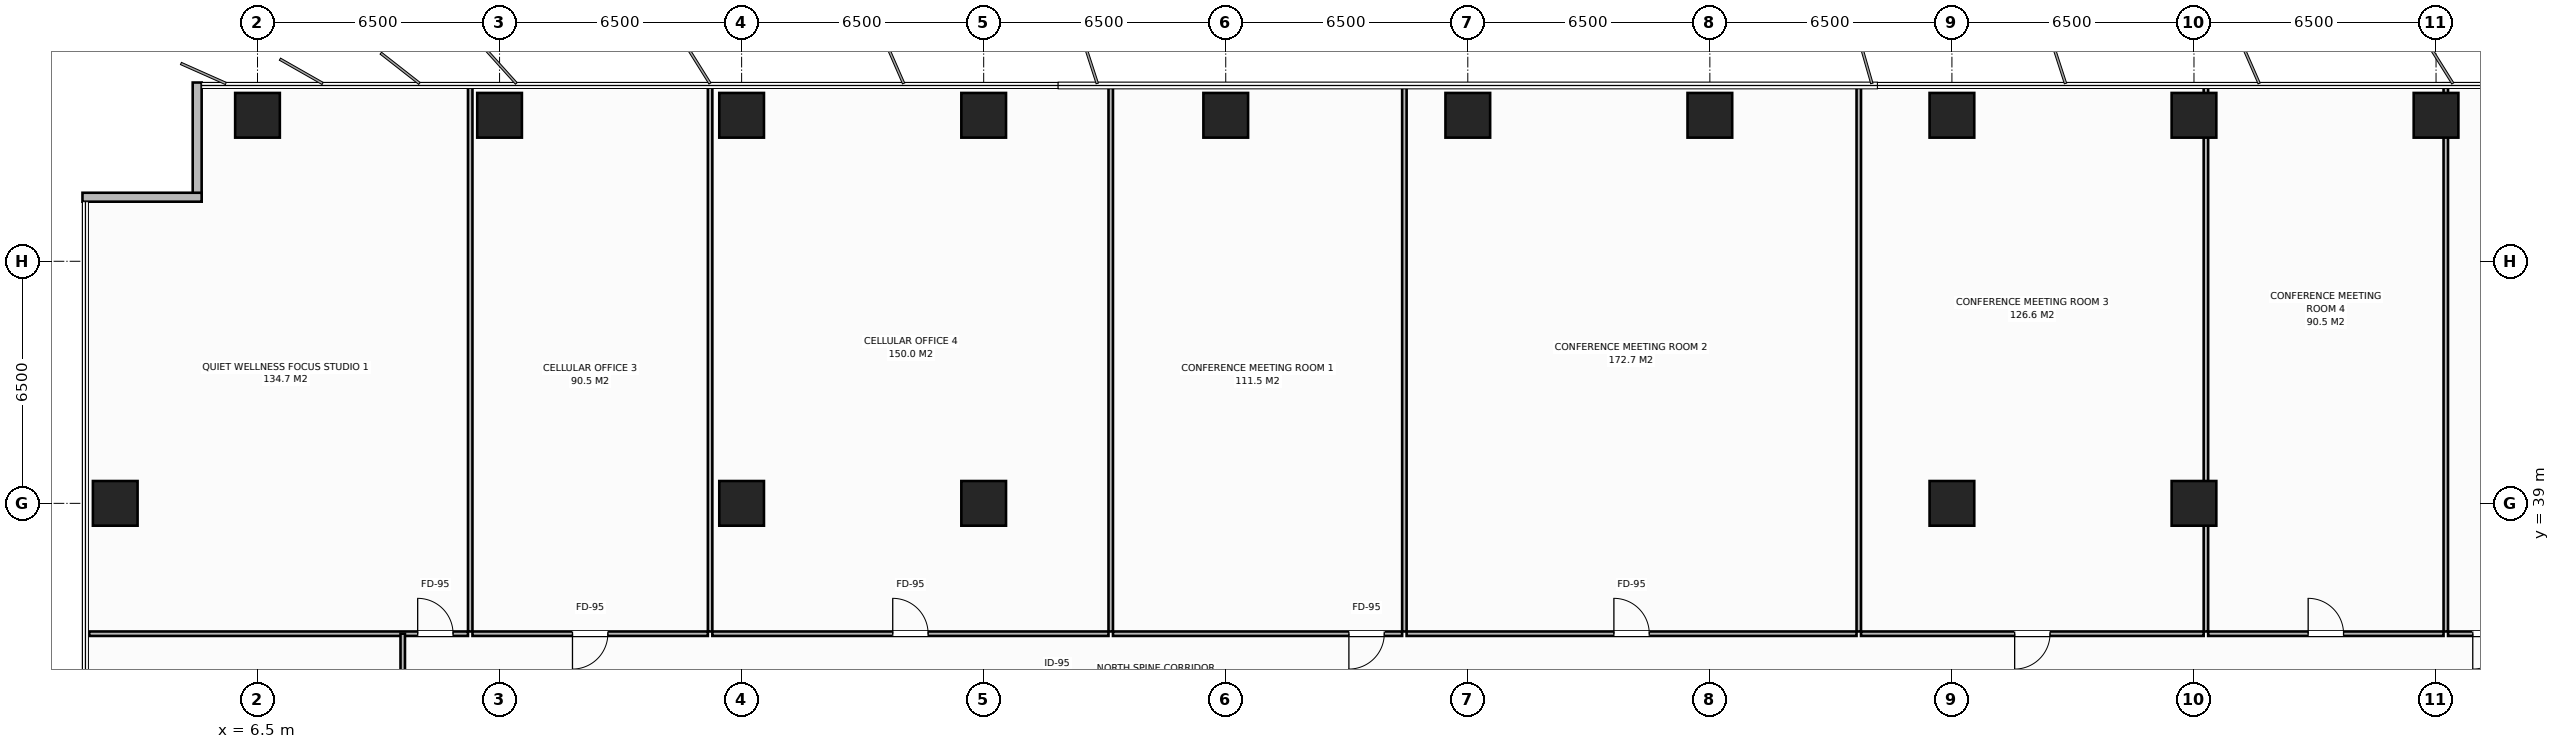
"""IFC4 building model, lengths in metres.
Left out: names, types, materials, properties, quantities, classifications, styles, units other than length and angle.
Written with IfcOpenShell. Run it as: python <this file> out.ifc"""

import sys

from ifc_helpers import new_model, si_unit, direction, frame, frame_2d, origin, origin_2d, place, context, subcontext, project, spatial, rectangle, extrude, element, fill, save


model = new_model("IFC4")
c1 = context("Model", 3, precision=1e-05, world=origin(), true_north=direction((0.0, 1.0)))
c2 = subcontext(c1, "Body", "Model", "MODEL_VIEW")
j1 = project(units=[si_unit("LENGTHUNIT", "METRE"), si_unit("PLANEANGLEUNIT", "RADIAN")], contexts=[c1])
p1 = place(None, origin())
s1 = spatial("IfcSite", under=j1, at=p1, CompositionType="ELEMENT")
p2 = place(p1, origin())
s2 = spatial("IfcBuilding", under=s1, at=p2, CompositionType="ELEMENT")
p3 = place(p2, frame((0.0, 0.0, 124.0)))
s3 = spatial("IfcBuildingStorey", under=s2, at=p3, CompositionType="ELEMENT", Elevation=124.0)
for number, where, z_axis, x_axis in (
    (1, (19.5, 39.0, 0.0), (0.0, 0.0, 1.0), (1.0, 0.0, 0.0)),
    (2, (58.5, 39.0, 0.0), (0.0, 0.0, 1.0), (1.0, 0.0, 0.0)),
    (3, (26.0, 39.0, 0.0), (0.0, 0.0, 1.0), (1.0, 0.0, 0.0)),
    (4, (52.0, 39.0, 0.0), (0.0, 0.0, 1.0), (1.0, 0.0, 0.0)),
    (5, (6.5, 49.42, 0.0), (0.0, 0.0, 1.0), (1.0, 0.0, 0.0)),
    (6, (13.0, 49.42, 0.0), (0.0, 0.0, 1.0), (1.0, 0.0, 0.0)),
    (7, (19.5, 49.42, 0.0), (0.0, 0.0, 1.0), (1.0, 0.0, 0.0)),
    (8, (26.0, 49.42, 0.0), (0.0, 0.0, 1.0), (1.0, 0.0, 0.0)),
    (9, (32.5, 49.42, 0.0), (0.0, 0.0, 1.0), (1.0, 0.0, 0.0)),
    (10, (39.0, 49.42, 0.0), (0.0, 0.0, 1.0), (1.0, 0.0, 0.0)),
    (11, (45.5, 49.42, 0.0), (0.0, 0.0, 1.0), (1.0, 0.0, 0.0)),
    (12, (52.0, 49.42, 0.0), (0.0, 0.0, 1.0), (1.0, 0.0, 0.0)),
    (13, (58.5, 49.42, 0.0), (0.0, 0.0, 1.0), (1.0, 0.0, 0.0)),
    (14, (65.0, 49.42, 0.0), (0.0, 0.0, 1.0), (1.0, 0.0, 0.0)),
    (15, (2.68, 39.0, 0.0), (0.0, 0.0, 1.0), (1.0, 0.0, 0.0)),
):
    element("IfcColumn", number, at=place(p3, frame(where, z_axis=z_axis, x_axis=x_axis)), inside=s3, PredefinedType="COLUMN", context=c2, shape_type="SweptSolid", body=[
        extrude(rectangle(XDim=1.2, YDim=1.2, at=origin_2d()), origin(), (0.0, 0.0, 1.0), 3.8),
    ])
for number, where, z_axis, x_axis in (
    (16, (4.88, 47.1, 0.0), (0.0, 0.0, 1.0), (0.0, 1.0, 0.0)),
    (17, (1.8, 47.22, 0.0), (0.0, 0.0, 1.0), (1.0, 0.0, 0.0)),
):
    element("IfcWall", number, at=place(p3, frame(where, z_axis=z_axis, x_axis=x_axis)), inside=s3, PredefinedType="STANDARD", context=c2, shape_type="SweptSolid", body=[
        extrude(rectangle(XDim=3.2, YDim=0.24, at=frame_2d((1.6, 0.0))), origin(), (0.0, 0.0, 1.0), 3.565),
    ])
p4 = place(p3, frame((12.212, 35.56, 0.0), z_axis=(0.0, 0.0, 1.0), x_axis=(0.0, 1.0, 0.0)))
e18 = element("IfcWall", 18, at=p4, inside=s3, PredefinedType="PARTITIONING", context=c2, shape_type="SweptSolid", body=[
    extrude(rectangle(XDim=14.72, YDim=0.12, at=frame_2d((7.36, 0.0))), origin(), (0.0, 0.0, 1.0), 3.565),
])
p5 = place(p3, frame((1.98, 35.5, 0.0), z_axis=(0.0, 0.0, 1.0), x_axis=(1.0, 0.0, 0.0)))
e19 = element("IfcWall", 19, at=p5, inside=s3, PredefinedType="PARTITIONING", context=c2, shape_type="SweptSolid", body=[
    extrude(rectangle(XDim=10.172, YDim=0.12, at=frame_2d((5.086, 0.0))), origin(), (0.0, 0.0, 1.0), 3.565),
])
p6 = place(p5, frame((8.821, 0.0, 0.0)))
e20 = element("IfcOpeningElement", 20, at=p6, cuts=e19, PredefinedType="OPENING", context=c2, shape_type="SweptSolid", body=[
    extrude(rectangle(XDim=0.95, YDim=2.15, at=frame_2d((0.475, 1.075))), frame((0.0, 0.07, 0.0), z_axis=(0.0, -1.0, 0.0), x_axis=(1.0, 0.0, 0.0)), (0.0, 0.0, 1.0), 0.14),
])
p7 = place(p3, frame((18.654, 35.56, 0.0), z_axis=(0.0, 0.0, 1.0), x_axis=(0.0, 1.0, 0.0)))
e21 = element("IfcWall", 21, at=p7, inside=s3, PredefinedType="PARTITIONING", context=c2, shape_type="SweptSolid", body=[
    extrude(rectangle(XDim=14.72, YDim=0.12, at=frame_2d((7.36, 0.0))), origin(), (0.0, 0.0, 1.0), 3.565),
])
p8 = place(p3, frame((12.272, 35.5, 0.0), z_axis=(0.0, 0.0, 1.0), x_axis=(1.0, 0.0, 0.0)))
e22 = element("IfcWall", 22, at=p8, inside=s3, PredefinedType="PARTITIONING", context=c2, shape_type="SweptSolid", body=[
    extrude(rectangle(XDim=6.322, YDim=0.12, at=frame_2d((3.161, 0.0))), origin(), (0.0, 0.0, 1.0), 3.565),
])
p9 = place(p8, frame((2.686, 0.0, 0.0)))
e23 = element("IfcOpeningElement", 23, at=p9, cuts=e22, PredefinedType="OPENING", context=c2, shape_type="SweptSolid", body=[
    extrude(rectangle(XDim=0.95, YDim=2.15, at=frame_2d((0.475, 1.075))), frame((0.0, 0.07, 0.0), z_axis=(0.0, -1.0, 0.0), x_axis=(1.0, 0.0, 0.0)), (0.0, 0.0, 1.0), 0.14),
])
p10 = place(p3, frame((29.412, 35.56, 0.0), z_axis=(0.0, 0.0, 1.0), x_axis=(0.0, 1.0, 0.0)))
e24 = element("IfcWall", 24, at=p10, inside=s3, PredefinedType="PARTITIONING", context=c2, shape_type="SweptSolid", body=[
    extrude(rectangle(XDim=14.72, YDim=0.12, at=frame_2d((7.36, 0.0))), origin(), (0.0, 0.0, 1.0), 3.565),
])
p11 = place(p3, frame((18.714, 35.5, 0.0), z_axis=(0.0, 0.0, 1.0), x_axis=(1.0, 0.0, 0.0)))
e25 = element("IfcWall", 25, at=p11, inside=s3, PredefinedType="PARTITIONING", context=c2, shape_type="SweptSolid", body=[
    extrude(rectangle(XDim=10.638, YDim=0.12, at=frame_2d((5.319, 0.0))), origin(), (0.0, 0.0, 1.0), 3.565),
])
p12 = place(p11, frame((4.844, 0.0, 0.0)))
e26 = element("IfcOpeningElement", 26, at=p12, cuts=e25, PredefinedType="OPENING", context=c2, shape_type="SweptSolid", body=[
    extrude(rectangle(XDim=0.95, YDim=2.15, at=frame_2d((0.475, 1.075))), frame((0.0, 0.07, 0.0), z_axis=(0.0, -1.0, 0.0), x_axis=(1.0, 0.0, 0.0)), (0.0, 0.0, 1.0), 0.14),
])
p13 = place(p3, frame((37.297, 35.56, 0.0), z_axis=(0.0, 0.0, 1.0), x_axis=(0.0, 1.0, 0.0)))
e27 = element("IfcWall", 27, at=p13, inside=s3, PredefinedType="PARTITIONING", context=c2, shape_type="SweptSolid", body=[
    extrude(rectangle(XDim=14.72, YDim=0.12, at=frame_2d((7.36, 0.0))), origin(), (0.0, 0.0, 1.0), 3.565),
])
p14 = place(p3, frame((29.472, 35.5, 0.0), z_axis=(0.0, 0.0, 1.0), x_axis=(1.0, 0.0, 0.0)))
e28 = element("IfcWall", 28, at=p14, inside=s3, PredefinedType="PARTITIONING", context=c2, shape_type="SweptSolid", body=[
    extrude(rectangle(XDim=7.765, YDim=0.12, at=frame_2d((3.883, 0.0))), origin(), (0.0, 0.0, 1.0), 3.565),
])
p15 = place(p14, frame((6.335, 0.0, 0.0)))
e29 = element("IfcOpeningElement", 29, at=p15, cuts=e28, PredefinedType="OPENING", context=c2, shape_type="SweptSolid", body=[
    extrude(rectangle(XDim=0.95, YDim=2.15, at=frame_2d((0.475, 1.075))), frame((0.0, 0.07, 0.0), z_axis=(0.0, -1.0, 0.0), x_axis=(1.0, 0.0, 0.0)), (0.0, 0.0, 1.0), 0.14),
])
p16 = place(p3, frame((49.499, 35.56, 0.0), z_axis=(0.0, 0.0, 1.0), x_axis=(0.0, 1.0, 0.0)))
e30 = element("IfcWall", 30, at=p16, inside=s3, PredefinedType="PARTITIONING", context=c2, shape_type="SweptSolid", body=[
    extrude(rectangle(XDim=14.72, YDim=0.12, at=frame_2d((7.36, 0.0))), origin(), (0.0, 0.0, 1.0), 3.565),
])
p17 = place(p3, frame((37.357, 35.5, 0.0), z_axis=(0.0, 0.0, 1.0), x_axis=(1.0, 0.0, 0.0)))
e31 = element("IfcWall", 31, at=p17, inside=s3, PredefinedType="PARTITIONING", context=c2, shape_type="SweptSolid", body=[
    extrude(rectangle(XDim=12.082, YDim=0.12, at=frame_2d((6.041, 0.0))), origin(), (0.0, 0.0, 1.0), 3.565),
])
p18 = place(p17, frame((5.566, 0.0, 0.0)))
e32 = element("IfcOpeningElement", 32, at=p18, cuts=e31, PredefinedType="OPENING", context=c2, shape_type="SweptSolid", body=[
    extrude(rectangle(XDim=0.95, YDim=2.15, at=frame_2d((0.475, 1.075))), frame((0.0, 0.07, 0.0), z_axis=(0.0, -1.0, 0.0), x_axis=(1.0, 0.0, 0.0)), (0.0, 0.0, 1.0), 0.14),
])
p19 = place(p3, frame((58.821, 35.56, 0.0), z_axis=(0.0, 0.0, 1.0), x_axis=(0.0, 1.0, 0.0)))
e33 = element("IfcWall", 33, at=p19, inside=s3, PredefinedType="PARTITIONING", context=c2, shape_type="SweptSolid", body=[
    extrude(rectangle(XDim=14.72, YDim=0.12, at=frame_2d((7.36, 0.0))), origin(), (0.0, 0.0, 1.0), 3.565),
])
p20 = place(p3, frame((49.559, 35.5, 0.0), z_axis=(0.0, 0.0, 1.0), x_axis=(1.0, 0.0, 0.0)))
e34 = element("IfcWall", 34, at=p20, inside=s3, PredefinedType="PARTITIONING", context=c2, shape_type="SweptSolid", body=[
    extrude(rectangle(XDim=9.202, YDim=0.12, at=frame_2d((4.601, 0.0))), origin(), (0.0, 0.0, 1.0), 3.565),
])
p21 = place(p20, frame((4.126, 0.0, 0.0)))
e35 = element("IfcOpeningElement", 35, at=p21, cuts=e34, PredefinedType="OPENING", context=c2, shape_type="SweptSolid", body=[
    extrude(rectangle(XDim=0.95, YDim=2.15, at=frame_2d((0.475, 1.075))), frame((0.0, 0.07, 0.0), z_axis=(0.0, -1.0, 0.0), x_axis=(1.0, 0.0, 0.0)), (0.0, 0.0, 1.0), 0.14),
])
p22 = place(p3, frame((65.262, 35.56, 0.0), z_axis=(0.0, 0.0, 1.0), x_axis=(0.0, 1.0, 0.0)))
e36 = element("IfcWall", 36, at=p22, inside=s3, PredefinedType="PARTITIONING", context=c2, shape_type="SweptSolid", body=[
    extrude(rectangle(XDim=14.72, YDim=0.12, at=frame_2d((7.36, 0.0))), origin(), (0.0, 0.0, 1.0), 3.565),
])
p23 = place(p3, frame((58.881, 35.5, 0.0), z_axis=(0.0, 0.0, 1.0), x_axis=(1.0, 0.0, 0.0)))
e37 = element("IfcWall", 37, at=p23, inside=s3, PredefinedType="PARTITIONING", context=c2, shape_type="SweptSolid", body=[
    extrude(rectangle(XDim=6.321, YDim=0.12, at=frame_2d((3.161, 0.0))), origin(), (0.0, 0.0, 1.0), 3.565),
])
p24 = place(p23, frame((2.686, 0.0, 0.0)))
e38 = element("IfcOpeningElement", 38, at=p24, cuts=e37, PredefinedType="OPENING", context=c2, shape_type="SweptSolid", body=[
    extrude(rectangle(XDim=0.95, YDim=2.15, at=frame_2d((0.475, 1.075))), frame((0.0, 0.07, 0.0), z_axis=(0.0, -1.0, 0.0), x_axis=(1.0, 0.0, 0.0)), (0.0, 0.0, 1.0), 0.14),
])
p25 = place(p3, frame((65.322, 35.5, 0.0), z_axis=(0.0, 0.0, 1.0), x_axis=(1.0, 0.0, 0.0)))
e39 = element("IfcWall", 39, at=p25, inside=s3, PredefinedType="PARTITIONING", context=c2, shape_type="SweptSolid", body=[
    extrude(rectangle(XDim=10.698, YDim=0.12, at=frame_2d((5.349, 0.0))), origin(), (0.0, 0.0, 1.0), 3.565),
])
p26 = place(p25, frame((0.664, 0.0, 0.0)))
e40 = element("IfcOpeningElement", 40, at=p26, cuts=e39, PredefinedType="OPENING", context=c2, shape_type="SweptSolid", body=[
    extrude(rectangle(XDim=0.95, YDim=2.15, at=frame_2d((0.475, 1.075))), frame((0.0, 0.07, 0.0), z_axis=(0.0, -1.0, 0.0), x_axis=(1.0, 0.0, 0.0)), (0.0, 0.0, 1.0), 0.14),
])
p27 = place(p3, frame((10.4, 29.167, 0.0), z_axis=(0.0, 0.0, 1.0), x_axis=(0.0, 1.0, 0.0)))
e41 = element("IfcWall", 41, at=p27, inside=s3, PredefinedType="PARTITIONING", context=c2, shape_type="SweptSolid", body=[
    extrude(rectangle(XDim=6.333, YDim=0.12, at=frame_2d((3.167, 0.0))), origin(), (0.0, 0.0, 1.0), 3.565),
])
p28 = place(p27, frame((1.642, 0.0, 0.0)))
e42 = element("IfcOpeningElement", 42, at=p28, cuts=e41, PredefinedType="OPENING", context=c2, shape_type="SweptSolid", body=[
    extrude(rectangle(XDim=0.95, YDim=2.15, at=frame_2d((0.475, 1.075))), frame((0.0, 0.07, 0.0), z_axis=(0.0, -1.0, 0.0), x_axis=(1.0, 0.0, 0.0)), (0.0, 0.0, 1.0), 0.14),
])
p29 = place(p6, origin())
e43 = element("IfcDoor", 43, at=p29, inside=s3, OperationType="SINGLE_SWING_LEFT", PredefinedType="DOOR", context=c2, shape_type="SweptSolid", body=[
    extrude(rectangle(XDim=0.95, YDim=2.15, at=frame_2d((0.475, 1.075))), frame((0.0, 0.025, 0.0), z_axis=(0.0, -1.0, 0.0), x_axis=(1.0, 0.0, 0.0)), (0.0, 0.0, 1.0), 0.05),
])
fill(e20, e43)
p30 = place(p9, origin())
e44 = element("IfcDoor", 44, at=p30, inside=s3, OperationType="SINGLE_SWING_RIGHT", PredefinedType="DOOR", context=c2, shape_type="SweptSolid", body=[
    extrude(rectangle(XDim=0.95, YDim=2.15, at=frame_2d((0.475, 1.075))), frame((0.0, 0.025, 0.0), z_axis=(0.0, -1.0, 0.0), x_axis=(1.0, 0.0, 0.0)), (0.0, 0.0, 1.0), 0.05),
])
fill(e23, e44)
p31 = place(p12, origin())
e45 = element("IfcDoor", 45, at=p31, inside=s3, OperationType="SINGLE_SWING_LEFT", PredefinedType="DOOR", context=c2, shape_type="SweptSolid", body=[
    extrude(rectangle(XDim=0.95, YDim=2.15, at=frame_2d((0.475, 1.075))), frame((0.0, 0.025, 0.0), z_axis=(0.0, -1.0, 0.0), x_axis=(1.0, 0.0, 0.0)), (0.0, 0.0, 1.0), 0.05),
])
fill(e26, e45)
p32 = place(p15, origin())
e46 = element("IfcDoor", 46, at=p32, inside=s3, OperationType="SINGLE_SWING_RIGHT", PredefinedType="DOOR", context=c2, shape_type="SweptSolid", body=[
    extrude(rectangle(XDim=0.95, YDim=2.15, at=frame_2d((0.475, 1.075))), frame((0.0, 0.025, 0.0), z_axis=(0.0, -1.0, 0.0), x_axis=(1.0, 0.0, 0.0)), (0.0, 0.0, 1.0), 0.05),
])
fill(e29, e46)
p33 = place(p18, origin())
e47 = element("IfcDoor", 47, at=p33, inside=s3, OperationType="SINGLE_SWING_LEFT", PredefinedType="DOOR", context=c2, shape_type="SweptSolid", body=[
    extrude(rectangle(XDim=0.95, YDim=2.15, at=frame_2d((0.475, 1.075))), frame((0.0, 0.025, 0.0), z_axis=(0.0, -1.0, 0.0), x_axis=(1.0, 0.0, 0.0)), (0.0, 0.0, 1.0), 0.05),
])
fill(e32, e47)
p34 = place(p21, origin())
e48 = element("IfcDoor", 48, at=p34, inside=s3, OperationType="SINGLE_SWING_RIGHT", PredefinedType="DOOR", context=c2, shape_type="SweptSolid", body=[
    extrude(rectangle(XDim=0.95, YDim=2.15, at=frame_2d((0.475, 1.075))), frame((0.0, 0.025, 0.0), z_axis=(0.0, -1.0, 0.0), x_axis=(1.0, 0.0, 0.0)), (0.0, 0.0, 1.0), 0.05),
])
fill(e35, e48)
p35 = place(p24, origin())
e49 = element("IfcDoor", 49, at=p35, inside=s3, OperationType="SINGLE_SWING_LEFT", PredefinedType="DOOR", context=c2, shape_type="SweptSolid", body=[
    extrude(rectangle(XDim=0.95, YDim=2.15, at=frame_2d((0.475, 1.075))), frame((0.0, 0.025, 0.0), z_axis=(0.0, -1.0, 0.0), x_axis=(1.0, 0.0, 0.0)), (0.0, 0.0, 1.0), 0.05),
])
fill(e38, e49)
p36 = place(p26, origin())
e50 = element("IfcDoor", 50, at=p36, inside=s3, OperationType="SINGLE_SWING_RIGHT", PredefinedType="DOOR", context=c2, shape_type="SweptSolid", body=[
    extrude(rectangle(XDim=0.95, YDim=2.15, at=frame_2d((0.475, 1.075))), frame((0.0, 0.025, 0.0), z_axis=(0.0, -1.0, 0.0), x_axis=(1.0, 0.0, 0.0)), (0.0, 0.0, 1.0), 0.05),
])
fill(e40, e50)
save(model, sys.argv[1])
